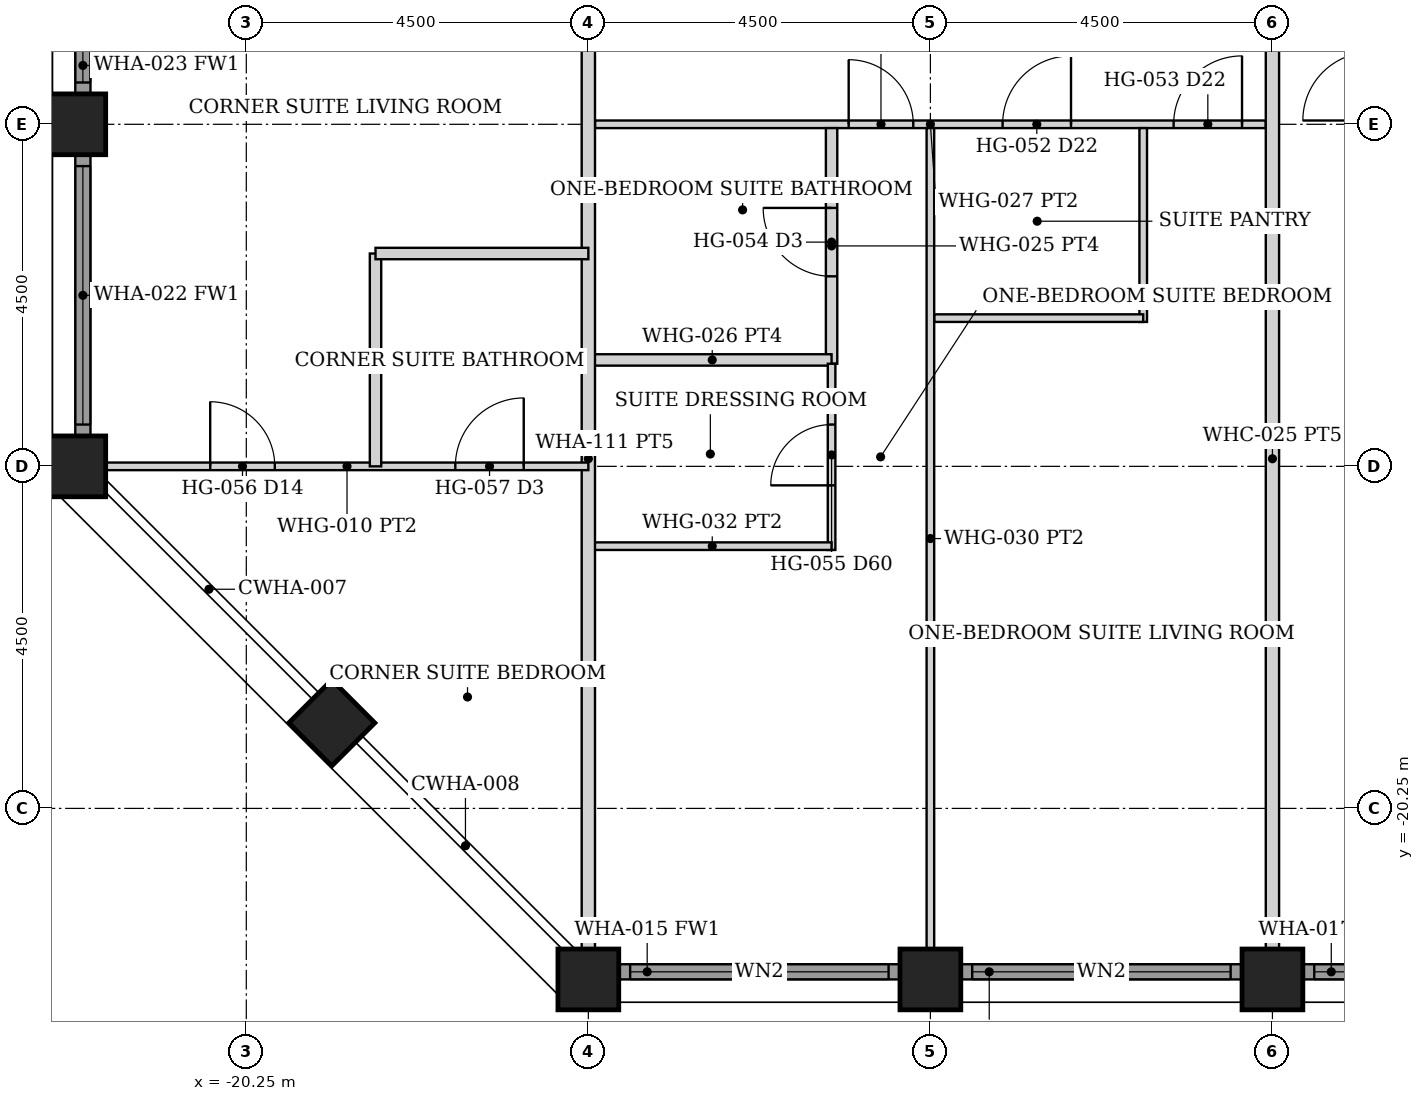
"""IFC4 building model, lengths in metres.
Left out: names, types, materials, properties, quantities, classifications, styles, units other than length and angle.
Written with IfcOpenShell. Run it as: python <this file> out.ifc"""

import sys

from ifc_helpers import new_model, si_unit, direction, frame, frame_2d, origin, origin_2d, place, context, subcontext, project, spatial, rectangle, hollow_rectangle, extrude, element, fill, save


model = new_model("IFC4")
c1 = context("Model", 3, precision=1e-05, world=origin(), true_north=direction((0.0, 1.0)))
c2 = subcontext(c1, "Body", "Model", "MODEL_VIEW")
j1 = project(units=[si_unit("LENGTHUNIT", "METRE"), si_unit("PLANEANGLEUNIT", "RADIAN")], contexts=[c1])
p1 = place(None, origin())
s1 = spatial("IfcSite", under=j1, at=p1, CompositionType="ELEMENT")
p2 = place(p1, origin())
s2 = spatial("IfcBuilding", under=s1, at=p2, CompositionType="ELEMENT")
p3 = place(p2, frame((0.0, 0.0, 183.2)))
s3 = spatial("IfcBuildingStorey", under=s2, at=p3, CompositionType="ELEMENT", Elevation=183.2)
for number, where, z_axis, x_axis in (
    (1, (-15.75, -22.5, 0.0), (0.0, 0.0, 1.0), (0.0, 1.0, 0.0)),
    (2, (-22.5, -15.75, 0.0), (0.0, 0.0, 1.0), (1.0, 0.0, 0.0)),
    (3, (-11.25, -22.5, 0.0), (0.0, 0.0, 1.0), (0.0, 1.0, 0.0)),
    (4, (-22.5, -11.25, 0.0), (0.0, 0.0, 1.0), (1.0, 0.0, 0.0)),
    (5, (-6.75, -22.5, 0.0), (0.0, 0.0, 1.0), (0.0, 1.0, 0.0)),
    (6, (-19.125, -19.125, 0.0), (0.0, 0.0, 1.0), (0.707, 0.707, 0.0)),
):
    element("IfcColumn", number, at=place(p3, frame(where, z_axis=z_axis, x_axis=x_axis)), inside=s3, PredefinedType="COLUMN", context=c2, shape_type="SweptSolid", body=[
        extrude(hollow_rectangle(XDim=0.8, YDim=0.8, WallThickness=0.045, at=origin_2d()), origin(), (0.0, 0.0, 1.0), 3.6),
    ])
p4 = place(p3, frame((-15.345, -22.4, 0.0), z_axis=(0.0, 0.0, 1.0), x_axis=(1.0, 0.0, 0.0)))
e7 = element("IfcWall", 7, at=p4, inside=s3, PredefinedType="SOLIDWALL", context=c2, shape_type="SweptSolid", body=[
    extrude(rectangle(XDim=3.69, YDim=0.2, at=frame_2d((1.845, 0.0))), origin(), (0.0, 0.0, 1.0), 2.479),
])
p5 = place(p4, frame((0.145, 0.0, 0.3)))
e8 = element("IfcOpeningElement", 8, at=p5, cuts=e7, PredefinedType="OPENING", context=c2, shape_type="SweptSolid", body=[
    extrude(rectangle(XDim=3.4, YDim=2.029, at=frame_2d((1.7, 1.015))), frame((0.0, 0.11, 0.0), z_axis=(0.0, -1.0, 0.0), x_axis=(1.0, 0.0, 0.0)), (0.0, 0.0, 1.0), 0.22),
])
p6 = place(p3, frame((-10.845, -22.4, 0.0), z_axis=(0.0, 0.0, 1.0), x_axis=(1.0, 0.0, 0.0)))
e9 = element("IfcWall", 9, at=p6, inside=s3, PredefinedType="SOLIDWALL", context=c2, shape_type="SweptSolid", body=[
    extrude(rectangle(XDim=3.69, YDim=0.2, at=frame_2d((1.845, 0.0))), origin(), (0.0, 0.0, 1.0), 2.479),
])
p7 = place(p6, frame((0.145, 0.0, 0.3)))
e10 = element("IfcOpeningElement", 10, at=p7, cuts=e9, PredefinedType="OPENING", context=c2, shape_type="SweptSolid", body=[
    extrude(rectangle(XDim=3.4, YDim=2.029, at=frame_2d((1.7, 1.015))), frame((0.0, 0.11, 0.0), z_axis=(0.0, -1.0, 0.0), x_axis=(1.0, 0.0, 0.0)), (0.0, 0.0, 1.0), 0.22),
])
p8 = place(p3, frame((-6.345, -22.4, 0.0), z_axis=(0.0, 0.0, 1.0), x_axis=(1.0, 0.0, 0.0)))
e11 = element("IfcWall", 11, at=p8, inside=s3, PredefinedType="SOLIDWALL", context=c2, shape_type="SweptSolid", body=[
    extrude(rectangle(XDim=3.69, YDim=0.2, at=frame_2d((1.845, 0.0))), origin(), (0.0, 0.0, 1.0), 2.479),
])
p9 = place(p8, frame((0.145, 0.0, 0.3)))
e12 = element("IfcOpeningElement", 12, at=p9, cuts=e11, PredefinedType="OPENING", context=c2, shape_type="SweptSolid", body=[
    extrude(rectangle(XDim=3.4, YDim=2.029, at=frame_2d((1.7, 1.015))), frame((0.0, 0.11, 0.0), z_axis=(0.0, -1.0, 0.0), x_axis=(1.0, 0.0, 0.0)), (0.0, 0.0, 1.0), 0.22),
])
p10 = place(p3, frame((-22.4, -15.345, 0.0), z_axis=(0.0, 0.0, 1.0), x_axis=(0.0, 1.0, 0.0)))
e13 = element("IfcWall", 13, at=p10, inside=s3, PredefinedType="SOLIDWALL", context=c2, shape_type="SweptSolid", body=[
    extrude(rectangle(XDim=3.69, YDim=0.2, at=frame_2d((1.845, 0.0))), origin(), (0.0, 0.0, 1.0), 2.479),
])
p11 = place(p10, frame((0.145, 0.0, 0.3)))
e14 = element("IfcOpeningElement", 14, at=p11, cuts=e13, PredefinedType="OPENING", context=c2, shape_type="SweptSolid", body=[
    extrude(rectangle(XDim=3.4, YDim=2.029, at=frame_2d((1.7, 1.015))), frame((0.0, 0.11, 0.0), z_axis=(0.0, -1.0, 0.0), x_axis=(1.0, 0.0, 0.0)), (0.0, 0.0, 1.0), 0.22),
])
p12 = place(p3, frame((-22.4, -10.845, 0.0), z_axis=(0.0, 0.0, 1.0), x_axis=(0.0, 1.0, 0.0)))
e15 = element("IfcWall", 15, at=p12, inside=s3, PredefinedType="SOLIDWALL", context=c2, shape_type="SweptSolid", body=[
    extrude(rectangle(XDim=3.69, YDim=0.2, at=frame_2d((1.845, 0.0))), origin(), (0.0, 0.0, 1.0), 2.479),
])
p13 = place(p12, frame((0.145, 0.0, 0.3)))
e16 = element("IfcOpeningElement", 16, at=p13, cuts=e15, PredefinedType="OPENING", context=c2, shape_type="SweptSolid", body=[
    extrude(rectangle(XDim=3.4, YDim=2.029, at=frame_2d((1.7, 1.015))), frame((0.0, 0.11, 0.0), z_axis=(0.0, -1.0, 0.0), x_axis=(1.0, 0.0, 0.0)), (0.0, 0.0, 1.0), 0.22),
])
p14 = place(p3, frame((-15.663, -11.25, 0.0), z_axis=(0.0, 0.0, 1.0), x_axis=(1.0, 0.0, 0.0)))
e17 = element("IfcWall", 17, at=p14, inside=s3, PredefinedType="PARTITIONING", context=c2, shape_type="SweptSolid", body=[
    extrude(rectangle(XDim=8.825, YDim=0.1, at=frame_2d((4.413, 0.0))), origin(), (0.0, 0.0, 1.0), 2.473),
])
p15 = place(p14, frame((5.363, 0.0, 0.0)))
e18 = element("IfcOpeningElement", 18, at=p15, cuts=e17, PredefinedType="OPENING", context=c2, shape_type="SweptSolid", body=[
    extrude(rectangle(XDim=0.9, YDim=2.1, at=frame_2d((0.45, 1.05))), frame((0.0, 0.06, 0.0), z_axis=(0.0, -1.0, 0.0), x_axis=(1.0, 0.0, 0.0)), (0.0, 0.0, 1.0), 0.12),
])
p16 = place(p14, frame((7.613, 0.0, 0.0)))
e19 = element("IfcOpeningElement", 19, at=p16, cuts=e17, PredefinedType="OPENING", context=c2, shape_type="SweptSolid", body=[
    extrude(rectangle(XDim=0.9, YDim=2.1, at=frame_2d((0.45, 1.05))), frame((0.0, 0.06, 0.0), z_axis=(0.0, -1.0, 0.0), x_axis=(1.0, 0.0, 0.0)), (0.0, 0.0, 1.0), 0.12),
])
p17 = place(p14, frame((3.337, 0.0, 0.0)))
e20 = element("IfcOpeningElement", 20, at=p17, cuts=e17, PredefinedType="OPENING", context=c2, shape_type="SweptSolid", body=[
    extrude(rectangle(XDim=0.85, YDim=2.1, at=frame_2d((0.425, 1.05))), frame((0.0, 0.06, 0.0), z_axis=(0.0, -1.0, 0.0), x_axis=(1.0, 0.0, 0.0)), (0.0, 0.0, 1.0), 0.12),
])
p18 = place(p3, frame((-8.45, -13.85, 0.0), z_axis=(0.0, 0.0, 1.0), x_axis=(0.0, 1.0, 0.0)))
e21 = element("IfcWall", 21, at=p18, inside=s3, PredefinedType="PARTITIONING", context=c2, shape_type="SweptSolid", body=[
    extrude(rectangle(XDim=2.55, YDim=0.1, at=frame_2d((1.275, 0.0))), origin(), (0.0, 0.0, 1.0), 2.473),
])
p19 = place(p3, frame((-11.2, -13.8, 0.0), z_axis=(0.0, 0.0, 1.0), x_axis=(1.0, 0.0, 0.0)))
e22 = element("IfcWall", 22, at=p19, inside=s3, PredefinedType="PARTITIONING", context=c2, shape_type="SweptSolid", body=[
    extrude(rectangle(XDim=2.75, YDim=0.1, at=frame_2d((1.375, 0.0))), origin(), (0.0, 0.0, 1.0), 2.473),
])
p20 = place(p3, frame((-11.25, -22.1, 0.0), z_axis=(0.0, 0.0, 1.0), x_axis=(0.0, 1.0, 0.0)))
e23 = element("IfcWall", 23, at=p20, inside=s3, PredefinedType="PARTITIONING", context=c2, shape_type="SweptSolid", body=[
    extrude(rectangle(XDim=10.8, YDim=0.1, at=frame_2d((5.4, 0.0))), origin(), (0.0, 0.0, 1.0), 2.473),
])
p21 = place(p3, frame((-12.55, -14.4, 0.0), z_axis=(0.0, 0.0, 1.0), x_axis=(0.0, 1.0, 0.0)))
e24 = element("IfcWall", 24, at=p21, inside=s3, PredefinedType="PARTITIONING", context=c2, shape_type="SweptSolid", body=[
    extrude(rectangle(XDim=3.1, YDim=0.15, at=frame_2d((1.55, 0.0))), origin(), (0.0, 0.0, 1.0), 2.473),
])
p22 = place(p21, frame((1.15, 0.0, 0.0)))
e25 = element("IfcOpeningElement", 25, at=p22, cuts=e24, PredefinedType="OPENING", context=c2, shape_type="SweptSolid", body=[
    extrude(rectangle(XDim=0.9, YDim=2.1, at=frame_2d((0.45, 1.05))), frame((0.0, 0.085, 0.0), z_axis=(0.0, -1.0, 0.0), x_axis=(1.0, 0.0, 0.0)), (0.0, 0.0, 1.0), 0.17),
])
p23 = place(p3, frame((-15.69, -14.35, 0.0), z_axis=(0.0, 0.0, 1.0), x_axis=(1.0, 0.0, 0.0)))
e26 = element("IfcWall", 26, at=p23, inside=s3, PredefinedType="PARTITIONING", context=c2, shape_type="SweptSolid", body=[
    extrude(rectangle(XDim=3.14, YDim=0.15, at=frame_2d((1.57, 0.0))), origin(), (0.0, 0.0, 1.0), 2.473),
])
p24 = place(p3, frame((-12.55, -16.85, 0.0), z_axis=(0.0, 0.0, 1.0), x_axis=(0.0, 1.0, 0.0)))
e27 = element("IfcWall", 27, at=p24, inside=s3, PredefinedType="PARTITIONING", context=c2, shape_type="SweptSolid", body=[
    extrude(rectangle(XDim=2.45, YDim=0.1, at=frame_2d((1.225, 0.0))), origin(), (0.0, 0.0, 1.0), 2.473),
])
p25 = place(p24, frame((0.85, 0.0, 0.0)))
e28 = element("IfcOpeningElement", 28, at=p25, cuts=e27, PredefinedType="OPENING", context=c2, shape_type="SweptSolid", body=[
    extrude(rectangle(XDim=0.8, YDim=2.1, at=frame_2d((0.4, 1.05))), frame((0.0, 0.06, 0.0), z_axis=(0.0, -1.0, 0.0), x_axis=(1.0, 0.0, 0.0)), (0.0, 0.0, 1.0), 0.12),
])
p26 = place(p3, frame((-15.69, -16.8, 0.0), z_axis=(0.0, 0.0, 1.0), x_axis=(1.0, 0.0, 0.0)))
e29 = element("IfcWall", 29, at=p26, inside=s3, PredefinedType="PARTITIONING", context=c2, shape_type="SweptSolid", body=[
    extrude(rectangle(XDim=3.14, YDim=0.1, at=frame_2d((1.57, 0.0))), origin(), (0.0, 0.0, 1.0), 2.473),
])
for number, where, z_axis, x_axis in (
    (30, (-15.75, -22.1, 0.0), (0.0, 0.0, 1.0), (0.0, 1.0, 0.0)),
    (31, (-6.75, -22.1, 0.0), (0.0, 0.0, 1.0), (0.0, 1.0, 0.0)),
):
    element("IfcWall", number, at=place(p3, frame(where, z_axis=z_axis, x_axis=x_axis)), inside=s3, PredefinedType="PARTITIONING", context=c2, shape_type="SweptSolid", body=[
        extrude(rectangle(XDim=12.9, YDim=0.175, at=frame_2d((6.45, 0.0))), origin(), (0.0, 0.0, 1.0), 2.473),
    ])
p27 = place(p3, frame((-22.1, -15.75, 0.0), z_axis=(0.0, 0.0, 1.0), x_axis=(1.0, 0.0, 0.0)))
e32 = element("IfcWall", 32, at=p27, inside=s3, PredefinedType="PARTITIONING", context=c2, shape_type="SweptSolid", body=[
    extrude(rectangle(XDim=6.35, YDim=0.1, at=frame_2d((3.175, 0.0))), origin(), (0.0, 0.0, 1.0), 2.473),
])
p28 = place(p27, frame((1.375, 0.0, 0.0)))
e33 = element("IfcOpeningElement", 33, at=p28, cuts=e32, PredefinedType="OPENING", context=c2, shape_type="SweptSolid", body=[
    extrude(rectangle(XDim=0.85, YDim=2.1, at=frame_2d((0.425, 1.05))), frame((0.0, 0.06, 0.0), z_axis=(0.0, -1.0, 0.0), x_axis=(1.0, 0.0, 0.0)), (0.0, 0.0, 1.0), 0.12),
])
p29 = place(p27, frame((4.6, 0.0, 0.0)))
e34 = element("IfcOpeningElement", 34, at=p29, cuts=e32, PredefinedType="OPENING", context=c2, shape_type="SweptSolid", body=[
    extrude(rectangle(XDim=0.9, YDim=2.1, at=frame_2d((0.45, 1.05))), frame((0.0, 0.06, 0.0), z_axis=(0.0, -1.0, 0.0), x_axis=(1.0, 0.0, 0.0)), (0.0, 0.0, 1.0), 0.12),
])
for number, where, z_axis, x_axis in (
    (35, (-18.55, -15.75, 0.0), (0.0, 0.0, 1.0), (0.0, 1.0, 0.0)),
    (36, (-18.55, -12.95, 0.0), (0.0, 0.0, 1.0), (1.0, 0.0, 0.0)),
):
    element("IfcWall", number, at=place(p3, frame(where, z_axis=z_axis, x_axis=x_axis)), inside=s3, PredefinedType="PARTITIONING", context=c2, shape_type="SweptSolid", body=[
        extrude(rectangle(XDim=2.8, YDim=0.15, at=frame_2d((1.4, 0.0))), origin(), (0.0, 0.0, 1.0), 2.473),
    ])
p30 = place(p5, origin())
e37 = element("IfcWindow", 37, at=p30, inside=s3, PartitioningType="SINGLE_PANEL", PredefinedType="WINDOW", context=c2, shape_type="SweptSolid", body=[
    extrude(rectangle(XDim=3.4, YDim=2.029, at=frame_2d((1.7, 1.015))), frame((0.0, 0.03, 0.0), z_axis=(0.0, -1.0, 0.0), x_axis=(1.0, 0.0, 0.0)), (0.0, 0.0, 1.0), 0.06),
])
fill(e8, e37)
p31 = place(p7, origin())
e38 = element("IfcWindow", 38, at=p31, inside=s3, PartitioningType="SINGLE_PANEL", PredefinedType="WINDOW", context=c2, shape_type="SweptSolid", body=[
    extrude(rectangle(XDim=3.4, YDim=2.029, at=frame_2d((1.7, 1.015))), frame((0.0, 0.03, 0.0), z_axis=(0.0, -1.0, 0.0), x_axis=(1.0, 0.0, 0.0)), (0.0, 0.0, 1.0), 0.06),
])
fill(e10, e38)
p32 = place(p9, origin())
e39 = element("IfcWindow", 39, at=p32, inside=s3, PartitioningType="SINGLE_PANEL", PredefinedType="WINDOW", context=c2, shape_type="SweptSolid", body=[
    extrude(rectangle(XDim=3.4, YDim=2.029, at=frame_2d((1.7, 1.015))), frame((0.0, 0.03, 0.0), z_axis=(0.0, -1.0, 0.0), x_axis=(1.0, 0.0, 0.0)), (0.0, 0.0, 1.0), 0.06),
])
fill(e12, e39)
p33 = place(p11, origin())
e40 = element("IfcWindow", 40, at=p33, inside=s3, PartitioningType="SINGLE_PANEL", PredefinedType="WINDOW", context=c2, shape_type="SweptSolid", body=[
    extrude(rectangle(XDim=3.4, YDim=2.029, at=frame_2d((1.7, 1.015))), frame((0.0, 0.03, 0.0), z_axis=(0.0, -1.0, 0.0), x_axis=(1.0, 0.0, 0.0)), (0.0, 0.0, 1.0), 0.06),
])
fill(e14, e40)
p34 = place(p13, origin())
e41 = element("IfcWindow", 41, at=p34, inside=s3, PartitioningType="SINGLE_PANEL", PredefinedType="WINDOW", context=c2, shape_type="SweptSolid", body=[
    extrude(rectangle(XDim=3.4, YDim=2.029, at=frame_2d((1.7, 1.015))), frame((0.0, 0.03, 0.0), z_axis=(0.0, -1.0, 0.0), x_axis=(1.0, 0.0, 0.0)), (0.0, 0.0, 1.0), 0.06),
])
fill(e16, e41)
p35 = place(p15, origin())
e42 = element("IfcDoor", 42, at=p35, inside=s3, OperationType="SINGLE_SWING_RIGHT", PredefinedType="DOOR", context=c2, shape_type="SweptSolid", body=[
    extrude(rectangle(XDim=0.9, YDim=2.1, at=frame_2d((0.45, 1.05))), frame((0.0, 0.025, 0.0), z_axis=(0.0, -1.0, 0.0), x_axis=(1.0, 0.0, 0.0)), (0.0, 0.0, 1.0), 0.05),
])
fill(e18, e42)
p36 = place(p16, origin())
e43 = element("IfcDoor", 43, at=p36, inside=s3, OperationType="SINGLE_SWING_RIGHT", PredefinedType="DOOR", context=c2, shape_type="SweptSolid", body=[
    extrude(rectangle(XDim=0.9, YDim=2.1, at=frame_2d((0.45, 1.05))), frame((0.0, 0.025, 0.0), z_axis=(0.0, -1.0, 0.0), x_axis=(1.0, 0.0, 0.0)), (0.0, 0.0, 1.0), 0.05),
])
fill(e19, e43)
p37 = place(p17, origin())
e44 = element("IfcDoor", 44, at=p37, inside=s3, OperationType="SINGLE_SWING_LEFT", PredefinedType="DOOR", context=c2, shape_type="SweptSolid", body=[
    extrude(rectangle(XDim=0.85, YDim=2.1, at=frame_2d((0.425, 1.05))), frame((0.0, 0.025, 0.0), z_axis=(0.0, -1.0, 0.0), x_axis=(1.0, 0.0, 0.0)), (0.0, 0.0, 1.0), 0.05),
])
fill(e20, e44)
p38 = place(p22, origin())
e45 = element("IfcDoor", 45, at=p38, inside=s3, OperationType="SINGLE_SWING_RIGHT", PredefinedType="DOOR", context=c2, shape_type="SweptSolid", body=[
    extrude(rectangle(XDim=0.9, YDim=2.1, at=frame_2d((0.45, 1.05))), frame((0.0, 0.025, 0.0), z_axis=(0.0, -1.0, 0.0), x_axis=(1.0, 0.0, 0.0)), (0.0, 0.0, 1.0), 0.05),
])
fill(e25, e45)
p39 = place(p25, origin())
e46 = element("IfcDoor", 46, at=p39, inside=s3, OperationType="SINGLE_SWING_LEFT", PredefinedType="DOOR", context=c2, shape_type="SweptSolid", body=[
    extrude(rectangle(XDim=0.8, YDim=2.1, at=frame_2d((0.4, 1.05))), frame((0.0, 0.025, 0.0), z_axis=(0.0, -1.0, 0.0), x_axis=(1.0, 0.0, 0.0)), (0.0, 0.0, 1.0), 0.05),
])
fill(e28, e46)
p40 = place(p28, origin())
e47 = element("IfcDoor", 47, at=p40, inside=s3, OperationType="SINGLE_SWING_LEFT", PredefinedType="DOOR", context=c2, shape_type="SweptSolid", body=[
    extrude(rectangle(XDim=0.85, YDim=2.1, at=frame_2d((0.425, 1.05))), frame((0.0, 0.025, 0.0), z_axis=(0.0, -1.0, 0.0), x_axis=(1.0, 0.0, 0.0)), (0.0, 0.0, 1.0), 0.05),
])
fill(e33, e47)
p41 = place(p29, origin())
e48 = element("IfcDoor", 48, at=p41, inside=s3, OperationType="SINGLE_SWING_RIGHT", PredefinedType="DOOR", context=c2, shape_type="SweptSolid", body=[
    extrude(rectangle(XDim=0.9, YDim=2.1, at=frame_2d((0.45, 1.05))), frame((0.0, 0.025, 0.0), z_axis=(0.0, -1.0, 0.0), x_axis=(1.0, 0.0, 0.0)), (0.0, 0.0, 1.0), 0.05),
])
fill(e34, e48)
save(model, sys.argv[1])
